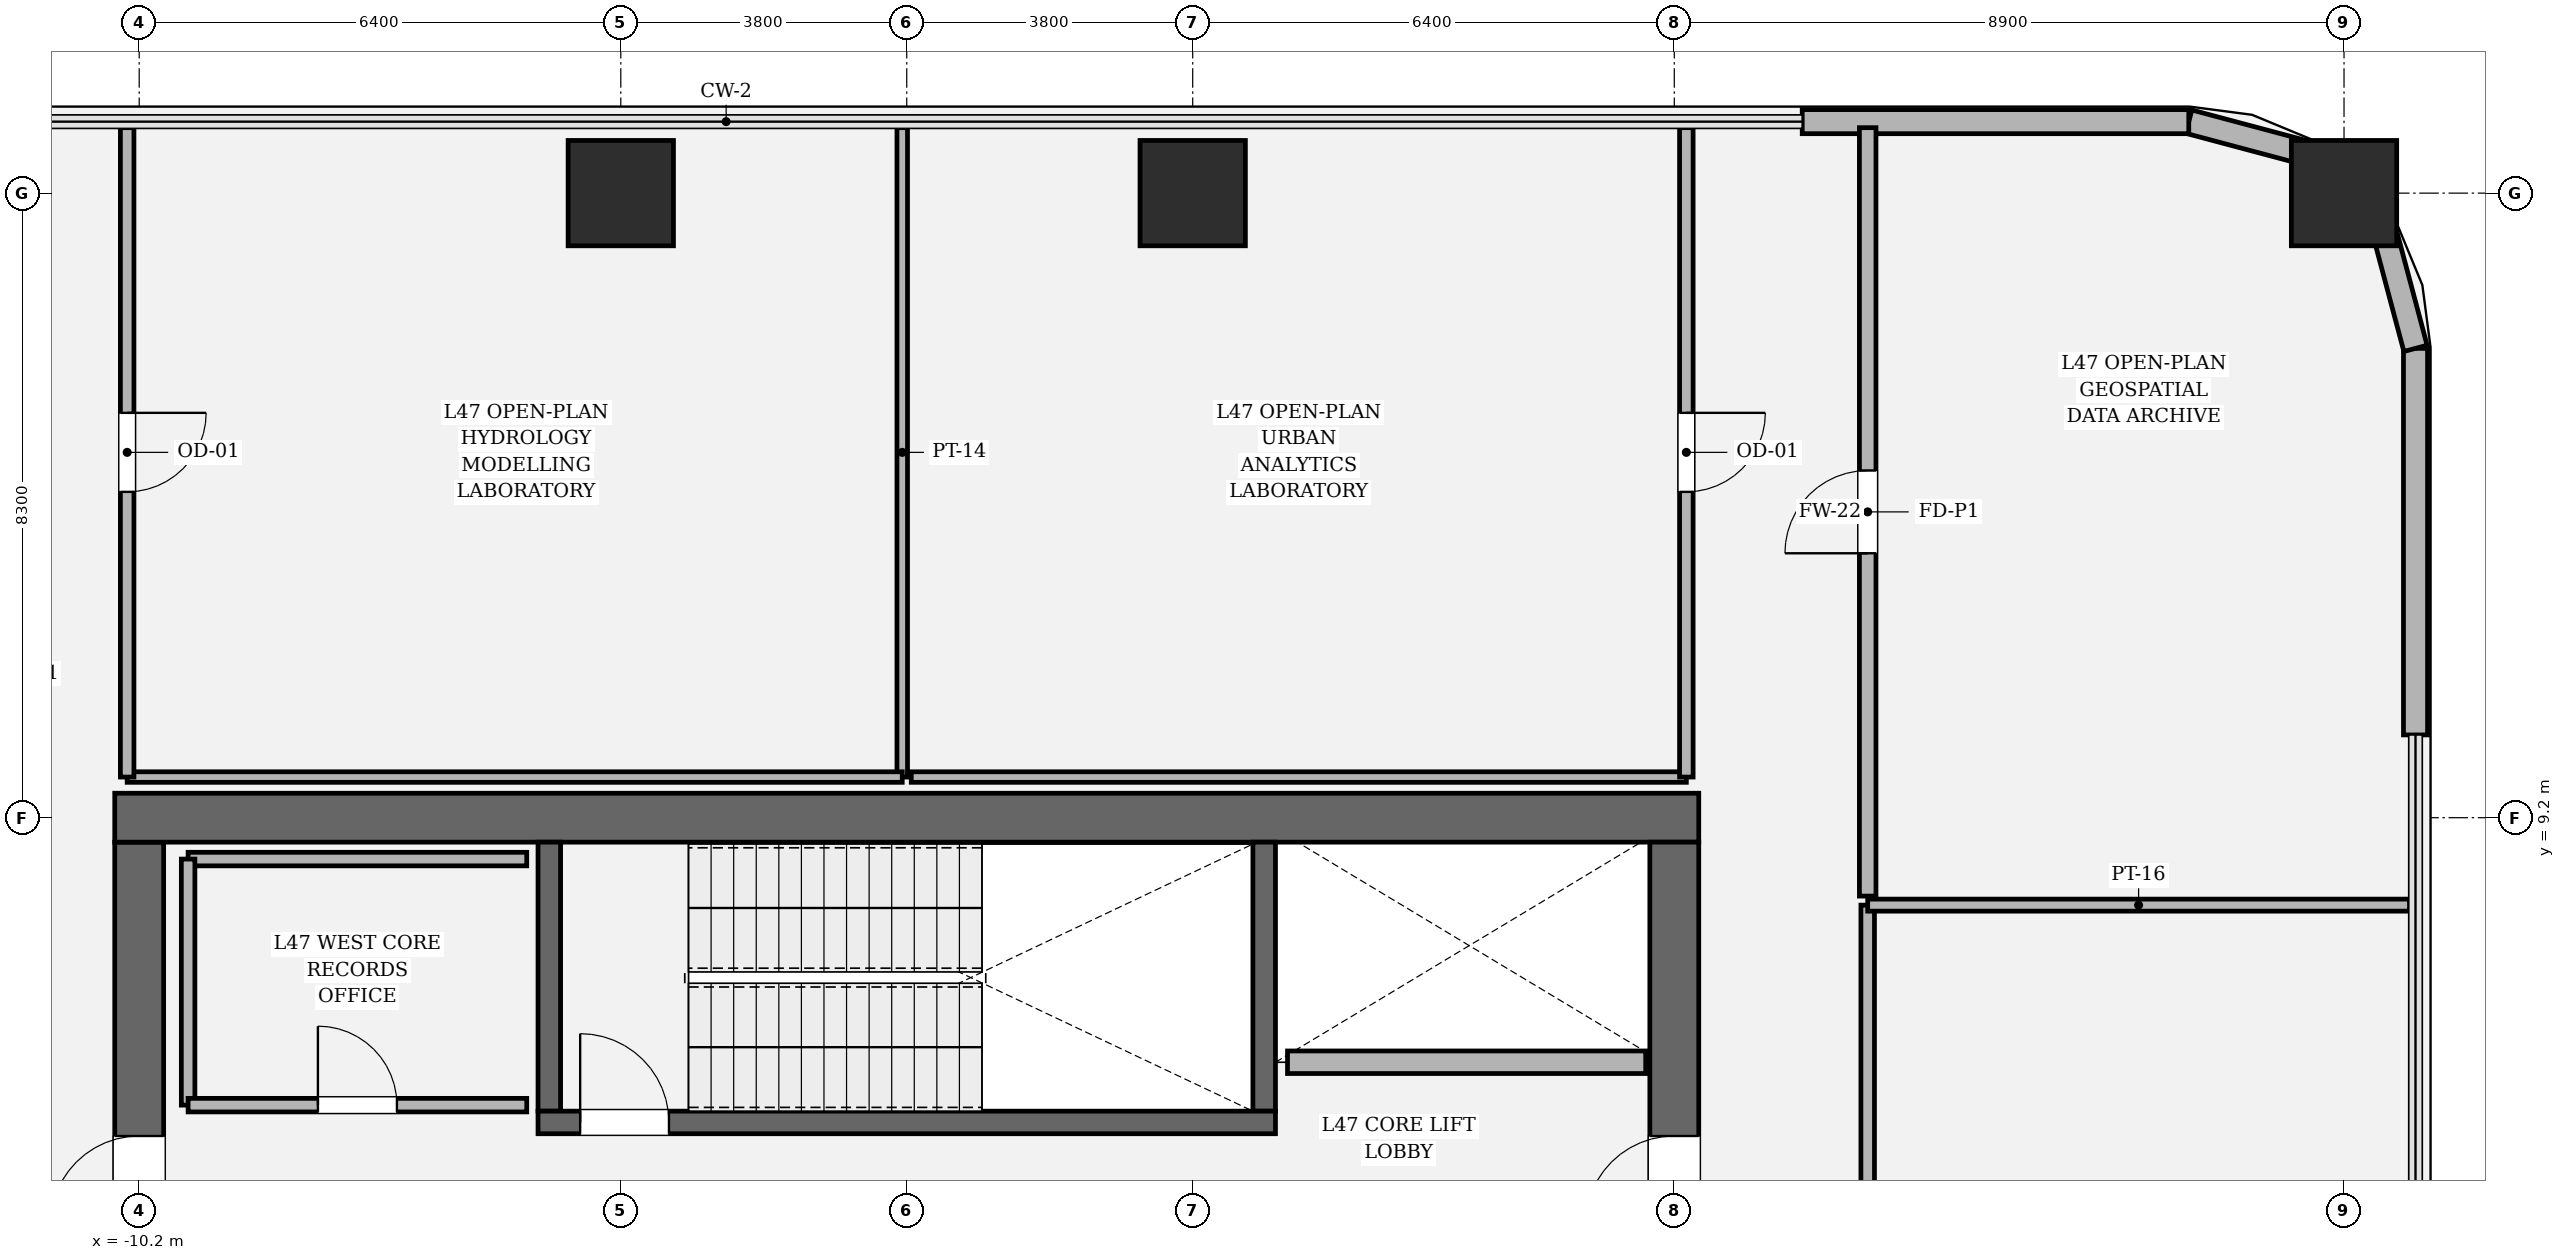
"""IFC4 building model, lengths in metres.
Left out: names, types, materials, properties, quantities, classifications, styles, units other than length and angle.
Written with IfcOpenShell. Run it as: python <this file> out.ifc"""

import sys

from ifc_helpers import new_model, si_unit, direction, frame, frame_2d, origin, origin_2d, place, context, subcontext, project, spatial, rectangle, hollow_rectangle, extrude, element, fill, save


model = new_model("IFC4")
c1 = context("Model", 3, precision=1e-05, world=origin(), true_north=direction((0.0, 1.0)))
c2 = subcontext(c1, "Body", "Model", "MODEL_VIEW")
j1 = project(units=[si_unit("LENGTHUNIT", "METRE"), si_unit("PLANEANGLEUNIT", "RADIAN")], contexts=[c1])
p1 = place(None, origin())
s1 = spatial("IfcSite", under=j1, at=p1, CompositionType="ELEMENT")
p2 = place(p1, origin())
s2 = spatial("IfcBuilding", under=s1, at=p2, CompositionType="ELEMENT")
p3 = place(p2, frame((0.0, 0.0, 200.55)))
s3 = spatial("IfcBuildingStorey", under=s2, at=p3, CompositionType="ELEMENT", Elevation=200.55)
p4 = place(p3, frame((-10.2, -8.875, 0.0), z_axis=(0.0, 0.0, 1.0), x_axis=(0.0, 1.0, 0.0)))
e1 = element("IfcWall", 1, at=p4, inside=s3, PredefinedType="SHEAR", context=c2, shape_type="SweptSolid", body=[
    extrude(rectangle(XDim=17.75, YDim=0.65, at=frame_2d((8.875, 0.0))), origin(), (0.0, 0.0, 1.0), 4.05),
])
p5 = place(p4, frame((12.665, 0.0, 0.0)))
e2 = element("IfcOpeningElement", 2, at=p5, cuts=e1, PredefinedType="OPENING", context=c2, shape_type="SweptSolid", body=[
    extrude(rectangle(XDim=1.18, YDim=2.2, at=frame_2d((0.59, 1.1))), frame((0.0, 0.335, 0.0), z_axis=(0.0, -1.0, 0.0), x_axis=(1.0, 0.0, 0.0)), (0.0, 0.0, 1.0), 0.67),
])
p6 = place(p3, frame((-10.525, 9.2, 0.0), z_axis=(0.0, 0.0, 1.0), x_axis=(1.0, 0.0, 0.0)))
e3 = element("IfcWall", 3, at=p6, inside=s3, PredefinedType="SHEAR", context=c2, shape_type="SweptSolid", body=[
    extrude(rectangle(XDim=21.05, YDim=0.65, at=frame_2d((10.525, 0.0))), origin(), (0.0, 0.0, 1.0), 4.05),
])
p7 = place(p3, frame((10.2, 8.875, 0.0), z_axis=(0.0, 0.0, 1.0), x_axis=(0.0, -1.0, 0.0)))
e4 = element("IfcWall", 4, at=p7, inside=s3, PredefinedType="SHEAR", context=c2, shape_type="SweptSolid", body=[
    extrude(rectangle(XDim=17.75, YDim=0.65, at=frame_2d((8.875, 0.0))), origin(), (0.0, 0.0, 1.0), 4.05),
])
p8 = place(p7, frame((3.905, 0.0, 0.0)))
e5 = element("IfcOpeningElement", 5, at=p8, cuts=e4, PredefinedType="OPENING", context=c2, shape_type="SweptSolid", body=[
    extrude(rectangle(XDim=1.18, YDim=2.2, at=frame_2d((0.59, 1.1))), frame((0.0, 0.335, 0.0), z_axis=(0.0, -1.0, 0.0), x_axis=(1.0, 0.0, 0.0)), (0.0, 0.0, 1.0), 0.67),
])
for number, where, z_axis, x_axis in (
    (6, (-4.75, 5.3, 0.0), (0.0, 0.0, 1.0), (0.0, 1.0, 0.0)),
    (7, (4.75, 8.875, 0.0), (0.0, 0.0, 1.0), (0.0, -1.0, 0.0)),
):
    element("IfcWall", number, at=place(p3, frame(where, z_axis=z_axis, x_axis=x_axis)), inside=s3, PredefinedType="SOLIDWALL", context=c2, shape_type="SweptSolid", body=[
        extrude(rectangle(XDim=3.575, YDim=0.3, at=frame_2d((1.788, 0.0))), origin(), (0.0, 0.0, 1.0), 4.05),
    ])
p9 = place(p3, frame((-4.9, 5.15, 0.0), z_axis=(0.0, 0.0, 1.0), x_axis=(1.0, 0.0, 0.0)))
e8 = element("IfcWall", 8, at=p9, inside=s3, PredefinedType="SOLIDWALL", context=c2, shape_type="SweptSolid", body=[
    extrude(rectangle(XDim=9.8, YDim=0.3, at=frame_2d((4.9, 0.0))), origin(), (0.0, 0.0, 1.0), 4.05),
])
p10 = place(p9, frame((0.56, 0.0, 0.0)))
e9 = element("IfcOpeningElement", 9, at=p10, cuts=e8, PredefinedType="OPENING", context=c2, shape_type="SweptSolid", body=[
    extrude(rectangle(XDim=1.18, YDim=2.2, at=frame_2d((0.59, 1.1))), frame((0.0, 0.16, 0.0), z_axis=(0.0, -1.0, 0.0), x_axis=(1.0, 0.0, 0.0)), (0.0, 0.0, 1.0), 0.32),
])
for number, where, z_axis, x_axis in (
    (10, (19.1, 17.5, 0.0), (0.0, 0.0, 1.0), (1.0, 0.0, 0.0)),
    (11, (3.8, 17.5, 0.0), (0.0, 0.0, 1.0), (1.0, 0.0, 0.0)),
    (12, (-3.8, 17.5, 0.0), (0.0, 0.0, 1.0), (1.0, 0.0, 0.0)),
):
    element("IfcColumn", number, at=place(p3, frame(where, z_axis=z_axis, x_axis=x_axis)), inside=s3, PredefinedType="COLUMN", context=c2, shape_type="SweptSolid", body=[
        extrude(hollow_rectangle(XDim=1.4, YDim=1.4, WallThickness=0.042, at=origin_2d()), origin(), (0.0, 0.0, 1.0), 4.05),
    ])
p11 = place(p3, frame((20.05, 10.3, 0.0), z_axis=(0.0, 0.0, 1.0), x_axis=(0.0, 1.0, 0.0)))
e13 = element("IfcWall", 13, at=p11, inside=s3, PredefinedType="SOLIDWALL", context=c2, shape_type="SweptSolid", body=[
    extrude(rectangle(XDim=5.137, YDim=0.32, at=frame_2d((2.568, 0.0))), origin(), (0.0, 0.0, 1.0), 3.77),
])
p12 = place(p3, frame((20.05, 15.437, 0.0), z_axis=(0.0, 0.0, 1.0), x_axis=(-0.257847112249, 0.966185730957, 0.0)))
e14 = element("IfcWall", 14, at=p12, inside=s3, PredefinedType="SOLIDWALL", context=c2, shape_type="SweptSolid", body=[
    extrude(rectangle(XDim=1.565, YDim=0.32, at=frame_2d((0.783, 0.0))), origin(), (0.0, 0.0, 1.0), 3.77),
])
p13 = place(p3, frame((19.646, 16.949, 0.0), z_axis=(0.0, 0.0, 1.0), x_axis=(-0.707106781187, 0.707106781187, 0.0)))
e15 = element("IfcWall", 15, at=p13, inside=s3, PredefinedType="SOLIDWALL", context=c2, shape_type="SweptSolid", body=[
    extrude(rectangle(XDim=1.552, YDim=0.32, at=frame_2d((0.776, 0.0))), origin(), (0.0, 0.0, 1.0), 2.444),
])
p14 = place(p3, frame((18.549, 18.047, 0.0), z_axis=(0.0, 0.0, 1.0), x_axis=(-0.966224582397, 0.257701486942, 0.0)))
e16 = element("IfcWall", 16, at=p14, inside=s3, PredefinedType="SOLIDWALL", context=c2, shape_type="SweptSolid", body=[
    extrude(rectangle(XDim=1.565, YDim=0.32, at=frame_2d((0.783, 0.0))), origin(), (0.0, 0.0, 1.0), 3.77),
])
p15 = place(p3, frame((17.037, 18.45, 0.0), z_axis=(0.0, 0.0, 1.0), x_axis=(-1.0, 0.0, 0.0)))
e17 = element("IfcWall", 17, at=p15, inside=s3, PredefinedType="SOLIDWALL", context=c2, shape_type="SweptSolid", body=[
    extrude(rectangle(XDim=5.137, YDim=0.32, at=frame_2d((2.568, 0.0))), origin(), (0.0, 0.0, 1.0), 3.77),
])
p16 = place(p3, frame((5.06, 5.95, 0.0), z_axis=(0.0, 0.0, 1.0), x_axis=(1.0, 0.0, 0.0)))
e18 = element("IfcWall", 18, at=p16, inside=s3, PredefinedType="SOLIDWALL", context=c2, shape_type="SweptSolid", body=[
    extrude(rectangle(XDim=4.76, YDim=0.3, at=frame_2d((2.38, 0.0))), origin(), (0.0, 0.0, 1.0), 3.77),
])
p17 = place(p3, frame((-5.05, 8.65, 0.0), z_axis=(0.0, 0.0, 1.0), x_axis=(-1.0, 0.0, 0.0)))
e19 = element("IfcWall", 19, at=p17, inside=s3, PredefinedType="PARTITIONING", context=c2, shape_type="SweptSolid", body=[
    extrude(rectangle(XDim=4.5, YDim=0.18, at=frame_2d((2.25, 0.0))), origin(), (0.0, 0.0, 1.0), 3.77),
])
p18 = place(p3, frame((-9.55, 8.65, 0.0), z_axis=(0.0, 0.0, 1.0), x_axis=(0.0, -1.0, 0.0)))
e20 = element("IfcWall", 20, at=p18, inside=s3, PredefinedType="PARTITIONING", context=c2, shape_type="SweptSolid", body=[
    extrude(rectangle(XDim=3.27, YDim=0.18, at=frame_2d((1.635, 0.0))), origin(), (0.0, 0.0, 1.0), 3.77),
])
p19 = place(p3, frame((-9.55, 5.38, 0.0), z_axis=(0.0, 0.0, 1.0), x_axis=(1.0, 0.0, 0.0)))
e21 = element("IfcWall", 21, at=p19, inside=s3, PredefinedType="PARTITIONING", context=c2, shape_type="SweptSolid", body=[
    extrude(rectangle(XDim=4.5, YDim=0.18, at=frame_2d((2.25, 0.0))), origin(), (0.0, 0.0, 1.0), 3.77),
])
p20 = place(p19, frame((1.725, 0.0, 0.0)))
e22 = element("IfcOpeningElement", 22, at=p20, cuts=e21, PredefinedType="OPENING", context=c2, shape_type="SweptSolid", body=[
    extrude(rectangle(XDim=1.05, YDim=2.2, at=frame_2d((0.525, 1.1))), frame((0.0, 0.1, 0.0), z_axis=(0.0, -1.0, 0.0), x_axis=(1.0, 0.0, 0.0)), (0.0, 0.0, 1.0), 0.2),
])
p21 = place(p3, frame((12.77, -11.49, 0.0), z_axis=(0.0, 0.0, 1.0), x_axis=(0.0, 1.0, 0.0)))
e23 = element("IfcWall", 23, at=p21, inside=s3, PredefinedType="PARTITIONING", context=c2, shape_type="SweptSolid", body=[
    extrude(rectangle(XDim=19.528, YDim=0.18, at=frame_2d((9.764, 0.0))), origin(), (0.0, 0.0, 1.0), 2.444),
])
p22 = place(p21, frame((9.239, 0.0, 0.0)))
e24 = element("IfcOpeningElement", 24, at=p22, cuts=e23, PredefinedType="OPENING", context=c2, shape_type="SweptSolid", body=[
    extrude(rectangle(XDim=1.05, YDim=2.2, at=frame_2d((0.525, 1.1))), frame((0.0, 0.1, 0.0), z_axis=(0.0, -1.0, 0.0), x_axis=(1.0, 0.0, 0.0)), (0.0, 0.0, 1.0), 0.2),
])
p23 = place(p3, frame((12.77, 8.038, 0.0), z_axis=(0.0, 0.0, 1.0), x_axis=(1.0, 0.0, 0.0)))
e25 = element("IfcWall", 25, at=p23, inside=s3, PredefinedType="PARTITIONING", context=c2, shape_type="SweptSolid", body=[
    extrude(rectangle(XDim=7.2, YDim=0.16, at=frame_2d((3.6, 0.0))), origin(), (0.0, 0.0, 1.0), 2.444),
])
p24 = place(p3, frame((12.77, 8.158, 0.0), z_axis=(0.0, 0.0, 1.0), x_axis=(0.0, 1.0, 0.0)))
e26 = element("IfcWall", 26, at=p24, inside=s3, PredefinedType="SOLIDWALL", context=c2, shape_type="SweptSolid", body=[
    extrude(rectangle(XDim=10.212, YDim=0.22, at=frame_2d((5.106, 0.0))), origin(), (0.0, 0.0, 1.0), 2.444),
])
p25 = place(p24, frame((4.556, 0.0, 0.0)))
e27 = element("IfcOpeningElement", 27, at=p25, cuts=e26, PredefinedType="OPENING", context=c2, shape_type="SweptSolid", body=[
    extrude(rectangle(XDim=1.1, YDim=2.2, at=frame_2d((0.55, 1.1))), frame((0.0, 0.12, 0.0), z_axis=(0.0, -1.0, 0.0), x_axis=(1.0, 0.0, 0.0)), (0.0, 0.0, 1.0), 0.24),
])
p26 = place(p3, frame((-0.06, 18.37, 0.0), z_axis=(0.0, 0.0, 1.0), x_axis=(0.0, -1.0, 0.0)))
e28 = element("IfcWall", 28, at=p26, inside=s3, PredefinedType="PARTITIONING", context=c2, shape_type="SweptSolid", body=[
    extrude(rectangle(XDim=8.63, YDim=0.14, at=frame_2d((4.315, 0.0))), origin(), (0.0, 0.0, 1.0), 2.444),
])
p27 = place(p3, frame((-0.06, 9.74, 0.0), z_axis=(0.0, 0.0, 1.0), x_axis=(-1.0, 0.0, 0.0)))
e29 = element("IfcWall", 29, at=p27, inside=s3, PredefinedType="PARTITIONING", context=c2, shape_type="SweptSolid", body=[
    extrude(rectangle(XDim=10.3, YDim=0.14, at=frame_2d((5.15, 0.0))), origin(), (0.0, 0.0, 1.0), 2.444),
])
p28 = place(p3, frame((-10.36, 9.74, 0.0), z_axis=(0.0, 0.0, 1.0), x_axis=(0.0, 1.0, 0.0)))
e30 = element("IfcWall", 30, at=p28, inside=s3, PredefinedType="PARTITIONING", context=c2, shape_type="SweptSolid", body=[
    extrude(rectangle(XDim=8.63, YDim=0.18, at=frame_2d((4.315, 0.0))), origin(), (0.0, 0.0, 1.0), 2.444),
])
p29 = place(p28, frame((3.79, 0.0, 0.0)))
e31 = element("IfcOpeningElement", 31, at=p29, cuts=e30, PredefinedType="OPENING", context=c2, shape_type="SweptSolid", body=[
    extrude(rectangle(XDim=1.05, YDim=2.2, at=frame_2d((0.525, 1.1))), frame((0.0, 0.1, 0.0), z_axis=(0.0, -1.0, 0.0), x_axis=(1.0, 0.0, 0.0)), (0.0, 0.0, 1.0), 0.2),
])
p30 = place(p3, frame((10.36, 9.74, 0.0), z_axis=(0.0, 0.0, 1.0), x_axis=(-1.0, 0.0, 0.0)))
e32 = element("IfcWall", 32, at=p30, inside=s3, PredefinedType="PARTITIONING", context=c2, shape_type="SweptSolid", body=[
    extrude(rectangle(XDim=10.3, YDim=0.14, at=frame_2d((5.15, 0.0))), origin(), (0.0, 0.0, 1.0), 2.444),
])
p31 = place(p3, frame((10.36, 18.37, 0.0), z_axis=(0.0, 0.0, 1.0), x_axis=(0.0, -1.0, 0.0)))
e33 = element("IfcWall", 33, at=p31, inside=s3, PredefinedType="PARTITIONING", context=c2, shape_type="SweptSolid", body=[
    extrude(rectangle(XDim=8.63, YDim=0.18, at=frame_2d((4.315, 0.0))), origin(), (0.0, 0.0, 1.0), 2.444),
])
p32 = place(p31, frame((3.79, 0.0, 0.0)))
e34 = element("IfcOpeningElement", 34, at=p32, cuts=e33, PredefinedType="OPENING", context=c2, shape_type="SweptSolid", body=[
    extrude(rectangle(XDim=1.05, YDim=2.2, at=frame_2d((0.525, 1.1))), frame((0.0, 0.1, 0.0), z_axis=(0.0, -1.0, 0.0), x_axis=(1.0, 0.0, 0.0)), (0.0, 0.0, 1.0), 0.2),
])
p33 = place(p10, origin())
e35 = element("IfcDoor", 35, at=p33, inside=s3, OperationType="SINGLE_SWING_LEFT", PredefinedType="DOOR", context=c2, shape_type="SweptSolid", body=[
    extrude(rectangle(XDim=1.18, YDim=2.2, at=frame_2d((0.59, 1.1))), frame((0.0, 0.025, 0.0), z_axis=(0.0, -1.0, 0.0), x_axis=(1.0, 0.0, 0.0)), (0.0, 0.0, 1.0), 0.05),
])
fill(e9, e35)
p34 = place(p5, origin())
e36 = element("IfcDoor", 36, at=p34, inside=s3, OperationType="SINGLE_SWING_LEFT", PredefinedType="DOOR", context=c2, shape_type="SweptSolid", body=[
    extrude(rectangle(XDim=1.18, YDim=2.2, at=frame_2d((0.59, 1.1))), frame((0.0, 0.025, 0.0), z_axis=(0.0, -1.0, 0.0), x_axis=(1.0, 0.0, 0.0)), (0.0, 0.0, 1.0), 0.05),
])
fill(e2, e36)
p35 = place(p8, origin())
e37 = element("IfcDoor", 37, at=p35, inside=s3, OperationType="SINGLE_SWING_RIGHT", PredefinedType="DOOR", context=c2, shape_type="SweptSolid", body=[
    extrude(rectangle(XDim=1.18, YDim=2.2, at=frame_2d((0.59, 1.1))), frame((0.0, 0.025, 0.0), z_axis=(0.0, -1.0, 0.0), x_axis=(1.0, 0.0, 0.0)), (0.0, 0.0, 1.0), 0.05),
])
fill(e5, e37)
p36 = place(p20, origin())
e38 = element("IfcDoor", 38, at=p36, inside=s3, OperationType="SINGLE_SWING_LEFT", PredefinedType="DOOR", context=c2, shape_type="SweptSolid", body=[
    extrude(rectangle(XDim=1.05, YDim=2.2, at=frame_2d((0.525, 1.1))), frame((0.0, 0.025, 0.0), z_axis=(0.0, -1.0, 0.0), x_axis=(1.0, 0.0, 0.0)), (0.0, 0.0, 1.0), 0.05),
])
fill(e22, e38)
p37 = place(p25, origin())
e39 = element("IfcDoor", 39, at=p37, inside=s3, OperationType="SINGLE_SWING_LEFT", PredefinedType="DOOR", context=c2, shape_type="SweptSolid", body=[
    extrude(rectangle(XDim=1.1, YDim=2.2, at=frame_2d((0.55, 1.1))), frame((0.0, 0.025, 0.0), z_axis=(0.0, -1.0, 0.0), x_axis=(1.0, 0.0, 0.0)), (0.0, 0.0, 1.0), 0.05),
])
fill(e27, e39)
p38 = place(p29, origin())
e40 = element("IfcDoor", 40, at=p38, inside=s3, OperationType="SINGLE_SWING_RIGHT", PredefinedType="DOOR", context=c2, shape_type="SweptSolid", body=[
    extrude(rectangle(XDim=1.05, YDim=2.2, at=frame_2d((0.525, 1.1))), frame((0.0, 0.025, 0.0), z_axis=(0.0, -1.0, 0.0), x_axis=(1.0, 0.0, 0.0)), (0.0, 0.0, 1.0), 0.05),
])
fill(e31, e40)
p39 = place(p32, origin())
e41 = element("IfcDoor", 41, at=p39, inside=s3, OperationType="SINGLE_SWING_LEFT", PredefinedType="DOOR", context=c2, shape_type="SweptSolid", body=[
    extrude(rectangle(XDim=1.05, YDim=2.2, at=frame_2d((0.525, 1.1))), frame((0.0, 0.025, 0.0), z_axis=(0.0, -1.0, 0.0), x_axis=(1.0, 0.0, 0.0)), (0.0, 0.0, 1.0), 0.05),
])
fill(e34, e41)
save(model, sys.argv[1])
